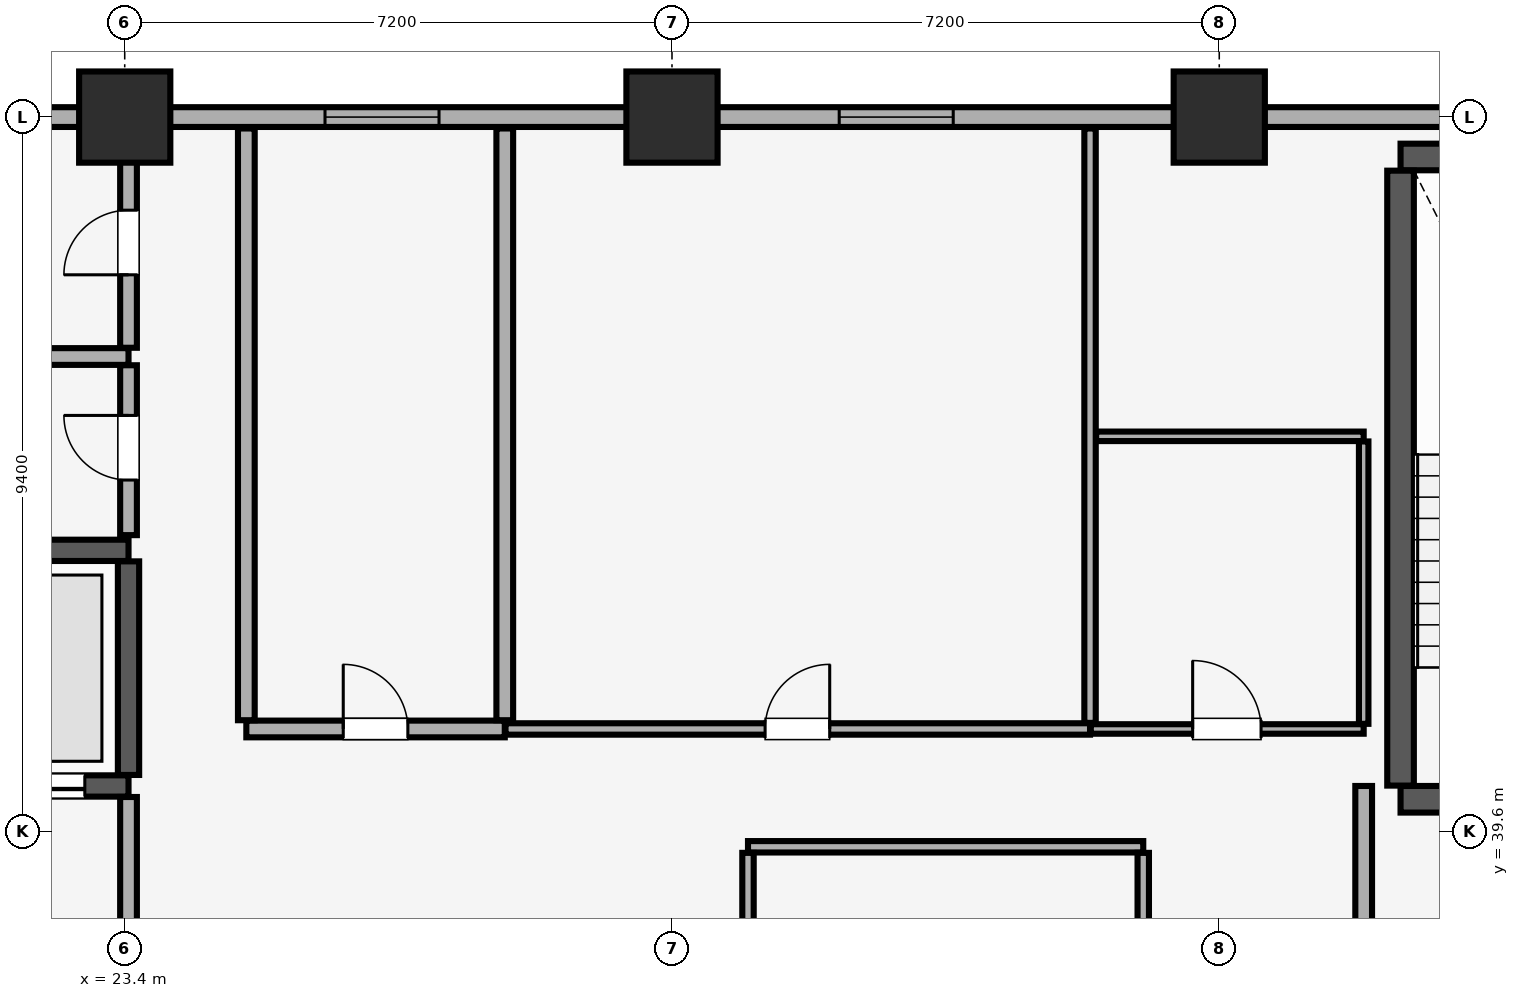
"""IFC4 building model, lengths in metres.
Left out: names, types, materials, properties, quantities, classifications, styles, units other than length and angle.
Written with IfcOpenShell. Run it as: python <this file> out.ifc"""

import sys

from ifc_helpers import new_model, si_unit, direction, frame, frame_2d, origin, origin_2d, place, context, subcontext, project, spatial, rectangle, extrude, element, fill, save


model = new_model("IFC4")
c1 = context("Model", 3, precision=1e-05, world=origin(), true_north=direction((0.0, 1.0)))
c2 = subcontext(c1, "Body", "Model", "MODEL_VIEW")
j1 = project(units=[si_unit("LENGTHUNIT", "METRE"), si_unit("PLANEANGLEUNIT", "RADIAN")], contexts=[c1])
p1 = place(None, origin())
s1 = spatial("IfcSite", under=j1, at=p1, CompositionType="ELEMENT")
p2 = place(p1, origin())
s2 = spatial("IfcBuilding", under=s1, at=p2, CompositionType="ELEMENT")
p3 = place(p2, frame((0.0, 0.0, 93.05)))
s3 = spatial("IfcBuildingStorey", under=s2, at=p3, CompositionType="ELEMENT", Elevation=93.05)
for number, where, z_axis, x_axis in (
    (1, (23.4, 49.0, 0.0), (0.0, 0.0, 1.0), (1.0, 0.0, 0.0)),
    (2, (30.6, 49.0, 0.0), (0.0, 0.0, 1.0), (1.0, 0.0, 0.0)),
    (3, (37.8, 49.0, 0.0), (0.0, 0.0, 1.0), (1.0, 0.0, 0.0)),
):
    element("IfcColumn", number, at=place(p3, frame(where, z_axis=z_axis, x_axis=x_axis)), inside=s3, PredefinedType="COLUMN", context=c2, shape_type="SweptSolid", body=[
        extrude(rectangle(XDim=1.2, YDim=1.2, at=origin_2d()), origin(), (0.0, 0.0, 1.0), 3.51),
    ])
p4 = place(p3, frame((79.8, 49.0, 0.0), z_axis=(0.0, 0.0, 1.0), x_axis=(-1.0, 0.0, 0.0)))
e4 = element("IfcWall", 4, at=p4, inside=s3, PredefinedType="SOLIDWALL", context=c2, shape_type="SweptSolid", body=[
    extrude(rectangle(XDim=75.6, YDim=0.26, at=frame_2d((37.8, 0.0))), origin(), (0.0, 0.0, 1.0), 2.56),
])
p5 = place(p4, frame((72.565, 0.0, 0.85)))
e5 = element("IfcOpeningElement", 5, at=p5, cuts=e4, PredefinedType="OPENING", context=c2, shape_type="SweptSolid", body=[
    extrude(rectangle(XDim=1.5, YDim=1.4, at=frame_2d((0.75, 0.7))), frame((0.0, 0.14, 0.0), z_axis=(0.0, -1.0, 0.0), x_axis=(1.0, 0.0, 0.0)), (0.0, 0.0, 1.0), 0.28),
])
p6 = place(p4, frame((67.45, 0.0, 0.85)))
e6 = element("IfcOpeningElement", 6, at=p6, cuts=e4, PredefinedType="OPENING", context=c2, shape_type="SweptSolid", body=[
    extrude(rectangle(XDim=1.5, YDim=1.4, at=frame_2d((0.75, 0.7))), frame((0.0, 0.14, 0.0), z_axis=(0.0, -1.0, 0.0), x_axis=(1.0, 0.0, 0.0)), (0.0, 0.0, 1.0), 0.28),
])
p7 = place(p4, frame((7.6, 0.0, 0.85)))
e7 = element("IfcOpeningElement", 7, at=p7, cuts=e4, PredefinedType="OPENING", context=c2, shape_type="SweptSolid", body=[
    extrude(rectangle(XDim=1.5, YDim=1.4, at=frame_2d((0.75, 0.7))), frame((0.0, 0.14, 0.0), z_axis=(0.0, -1.0, 0.0), x_axis=(1.0, 0.0, 0.0)), (0.0, 0.0, 1.0), 0.28),
])
p8 = place(p4, frame((1.535, 0.0, 0.85)))
e8 = element("IfcOpeningElement", 8, at=p8, cuts=e4, PredefinedType="OPENING", context=c2, shape_type="SweptSolid", body=[
    extrude(rectangle(XDim=1.5, YDim=1.4, at=frame_2d((0.75, 0.7))), frame((0.0, 0.14, 0.0), z_axis=(0.0, -1.0, 0.0), x_axis=(1.0, 0.0, 0.0)), (0.0, 0.0, 1.0), 0.28),
])
p9 = place(p4, frame((52.265, 0.0, 0.9)))
e9 = element("IfcOpeningElement", 9, at=p9, cuts=e4, PredefinedType="OPENING", context=c2, shape_type="SweptSolid", body=[
    extrude(rectangle(XDim=1.5, YDim=1.4, at=frame_2d((0.75, 0.7))), frame((0.0, 0.14, 0.0), z_axis=(0.0, -1.0, 0.0), x_axis=(1.0, 0.0, 0.0)), (0.0, 0.0, 1.0), 0.28),
])
p10 = place(p4, frame((45.5, 0.0, 0.9)))
e10 = element("IfcOpeningElement", 10, at=p10, cuts=e4, PredefinedType="OPENING", context=c2, shape_type="SweptSolid", body=[
    extrude(rectangle(XDim=1.5, YDim=1.4, at=frame_2d((0.75, 0.7))), frame((0.0, 0.14, 0.0), z_axis=(0.0, -1.0, 0.0), x_axis=(1.0, 0.0, 0.0)), (0.0, 0.0, 1.0), 0.28),
])
p11 = place(p4, frame((31.05, 0.0, 0.9)))
e11 = element("IfcOpeningElement", 11, at=p11, cuts=e4, PredefinedType="OPENING", context=c2, shape_type="SweptSolid", body=[
    extrude(rectangle(XDim=1.5, YDim=1.4, at=frame_2d((0.75, 0.7))), frame((0.0, 0.14, 0.0), z_axis=(0.0, -1.0, 0.0), x_axis=(1.0, 0.0, 0.0)), (0.0, 0.0, 1.0), 0.28),
])
p12 = place(p4, frame((27.85, 0.0, 0.9)))
e12 = element("IfcOpeningElement", 12, at=p12, cuts=e4, PredefinedType="OPENING", context=c2, shape_type="SweptSolid", body=[
    extrude(rectangle(XDim=1.5, YDim=1.4, at=frame_2d((0.75, 0.7))), frame((0.0, 0.14, 0.0), z_axis=(0.0, -1.0, 0.0), x_axis=(1.0, 0.0, 0.0)), (0.0, 0.0, 1.0), 0.28),
])
p13 = place(p4, frame((23.485, 0.0, 0.9)))
e13 = element("IfcOpeningElement", 13, at=p13, cuts=e4, PredefinedType="OPENING", context=c2, shape_type="SweptSolid", body=[
    extrude(rectangle(XDim=1.5, YDim=1.4, at=frame_2d((0.75, 0.7))), frame((0.0, 0.14, 0.0), z_axis=(0.0, -1.0, 0.0), x_axis=(1.0, 0.0, 0.0)), (0.0, 0.0, 1.0), 0.28),
])
p14 = place(p3, frame((40.185, 40.025, 0.0), z_axis=(0.0, 0.0, 1.0), x_axis=(1.0, 0.0, 0.0)))
e14 = element("IfcWall", 14, at=p14, inside=s3, PredefinedType="SHEAR", context=c2, shape_type="SweptSolid", body=[
    extrude(rectangle(XDim=3.63, YDim=0.35, at=frame_2d((1.815, 0.0))), origin(), (0.0, 0.0, 1.0), 3.51),
])
p15 = place(p14, frame((1.24, 0.0, 0.0)))
e15 = element("IfcOpeningElement", 15, at=p15, cuts=e14, PredefinedType="OPENING", context=c2, shape_type="SweptSolid", body=[
    extrude(rectangle(XDim=1.15, YDim=2.15, at=frame_2d((0.575, 1.075))), frame((0.0, 0.185, 0.0), z_axis=(0.0, -1.0, 0.0), x_axis=(1.0, 0.0, 0.0)), (0.0, 0.0, 1.0), 0.37),
])
p16 = place(p3, frame((40.185, 48.475, 0.0), z_axis=(0.0, 0.0, 1.0), x_axis=(1.0, 0.0, 0.0)))
e16 = element("IfcWall", 16, at=p16, inside=s3, PredefinedType="SHEAR", context=c2, shape_type="SweptSolid", body=[
    extrude(rectangle(XDim=3.63, YDim=0.35, at=frame_2d((1.815, 0.0))), origin(), (0.0, 0.0, 1.0), 3.51),
])
p17 = place(p3, frame((40.185, 40.205, 0.0), z_axis=(0.0, 0.0, 1.0), x_axis=(0.0, 1.0, 0.0)))
e17 = element("IfcWall", 17, at=p17, inside=s3, PredefinedType="SHEAR", context=c2, shape_type="SweptSolid", body=[
    extrude(rectangle(XDim=8.09, YDim=0.35, at=frame_2d((4.045, 0.0))), origin(), (0.0, 0.0, 1.0), 3.51),
])
p18 = place(p3, frame((21.035, 40.2, 0.0), z_axis=(0.0, 0.0, 1.0), x_axis=(1.0, 0.0, 0.0)))
e18 = element("IfcWall", 18, at=p18, inside=s3, PredefinedType="SHEAR", context=c2, shape_type="SweptSolid", body=[
    extrude(rectangle(XDim=2.415, YDim=0.28, at=frame_2d((1.208, 0.0))), origin(), (0.0, 0.0, 1.0), 3.51),
])
p19 = place(p18, frame((0.54, 0.0, 0.0)))
e19 = element("IfcOpeningElement", 19, at=p19, cuts=e18, PredefinedType="OPENING", context=c2, shape_type="SweptSolid", body=[
    extrude(rectangle(XDim=1.3, YDim=2.3, at=frame_2d((0.65, 1.15))), frame((0.0, 0.15, 0.0), z_axis=(0.0, -1.0, 0.0), x_axis=(1.0, 0.0, 0.0)), (0.0, 0.0, 1.0), 0.3),
])
p20 = place(p3, frame((21.035, 43.3, 0.0), z_axis=(0.0, 0.0, 1.0), x_axis=(1.0, 0.0, 0.0)))
e20 = element("IfcWall", 20, at=p20, inside=s3, PredefinedType="SHEAR", context=c2, shape_type="SweptSolid", body=[
    extrude(rectangle(XDim=2.415, YDim=0.28, at=frame_2d((1.208, 0.0))), origin(), (0.0, 0.0, 1.0), 3.51),
])
p21 = place(p3, frame((23.45, 40.345, 0.0), z_axis=(0.0, 0.0, 1.0), x_axis=(0.0, 1.0, 0.0)))
e21 = element("IfcWall", 21, at=p21, inside=s3, PredefinedType="SHEAR", context=c2, shape_type="SweptSolid", body=[
    extrude(rectangle(XDim=2.81, YDim=0.28, at=frame_2d((1.405, 0.0))), origin(), (0.0, 0.0, 1.0), 3.51),
])
p22 = place(p3, frame((23.45, 34.415, 0.0), z_axis=(0.0, 0.0, 1.0), x_axis=(0.0, 1.0, 0.0)))
e22 = element("IfcWall", 22, at=p22, inside=s3, PredefinedType="PARTITIONING", context=c2, shape_type="SweptSolid", body=[
    extrude(rectangle(XDim=5.64, YDim=0.22, at=frame_2d((2.82, 0.0))), origin(), (0.0, 0.0, 1.0), 3.51),
])
p23 = place(p3, frame((39.7, 34.415, 0.0), z_axis=(0.0, 0.0, 1.0), x_axis=(0.0, 1.0, 0.0)))
e23 = element("IfcWall", 23, at=p23, inside=s3, PredefinedType="PARTITIONING", context=c2, shape_type="SweptSolid", body=[
    extrude(rectangle(XDim=5.785, YDim=0.22, at=frame_2d((2.893, 0.0))), origin(), (0.0, 0.0, 1.0), 3.51),
])
p24 = place(p3, frame((21.035, 45.85, 0.0), z_axis=(0.0, 0.0, 1.0), x_axis=(1.0, 0.0, 0.0)))
e24 = element("IfcWall", 24, at=p24, inside=s3, PredefinedType="PARTITIONING", context=c2, shape_type="SweptSolid", body=[
    extrude(rectangle(XDim=2.415, YDim=0.22, at=frame_2d((1.208, 0.0))), origin(), (0.0, 0.0, 1.0), 3.51),
])
p25 = place(p3, frame((23.45, 43.5, 0.0), z_axis=(0.0, 0.0, 1.0), x_axis=(0.0, 1.0, 0.0)))
e25 = element("IfcWall", 25, at=p25, inside=s3, PredefinedType="PARTITIONING", context=c2, shape_type="SweptSolid", body=[
    extrude(rectangle(XDim=2.235, YDim=0.22, at=frame_2d((1.118, 0.0))), origin(), (0.0, 0.0, 1.0), 3.51),
])
p26 = place(p25, frame((0.725, 0.0, 0.0)))
e26 = element("IfcOpeningElement", 26, at=p26, cuts=e25, PredefinedType="OPENING", context=c2, shape_type="SweptSolid", body=[
    extrude(rectangle(XDim=0.85, YDim=2.1, at=frame_2d((0.425, 1.05))), frame((0.0, 0.12, 0.0), z_axis=(0.0, -1.0, 0.0), x_axis=(1.0, 0.0, 0.0)), (0.0, 0.0, 1.0), 0.24),
])
p27 = place(p3, frame((23.45, 45.965, 0.0), z_axis=(0.0, 0.0, 1.0), x_axis=(0.0, 1.0, 0.0)))
e27 = element("IfcWall", 27, at=p27, inside=s3, PredefinedType="PARTITIONING", context=c2, shape_type="SweptSolid", body=[
    extrude(rectangle(XDim=2.885, YDim=0.22, at=frame_2d((1.442, 0.0))), origin(), (0.0, 0.0, 1.0), 3.51),
])
p28 = place(p27, frame((0.96, 0.0, 0.0)))
e28 = element("IfcOpeningElement", 28, at=p28, cuts=e27, PredefinedType="OPENING", context=c2, shape_type="SweptSolid", body=[
    extrude(rectangle(XDim=0.85, YDim=2.1, at=frame_2d((0.425, 1.05))), frame((0.0, 0.12, 0.0), z_axis=(0.0, -1.0, 0.0), x_axis=(1.0, 0.0, 0.0)), (0.0, 0.0, 1.0), 0.24),
])
p29 = place(p3, frame((31.6, 39.4, 0.0), z_axis=(0.0, 0.0, 1.0), x_axis=(1.0, 0.0, 0.0)))
e29 = element("IfcWall", 29, at=p29, inside=s3, PredefinedType="PARTITIONING", context=c2, shape_type="SweptSolid", body=[
    extrude(rectangle(XDim=5.2, YDim=0.15, at=frame_2d((2.6, 0.0))), origin(), (0.0, 0.0, 1.0), 3.51),
])
for number, where, z_axis, x_axis in (
    (30, (31.6, 34.38, 0.0), (0.0, 0.0, 1.0), (0.0, 1.0, 0.0)),
    (31, (36.8, 34.38, 0.0), (0.0, 0.0, 1.0), (0.0, 1.0, 0.0)),
):
    element("IfcWall", number, at=place(p3, frame(where, z_axis=z_axis, x_axis=x_axis)), inside=s3, PredefinedType="PARTITIONING", context=c2, shape_type="SweptSolid", body=[
        extrude(rectangle(XDim=4.94, YDim=0.15, at=frame_2d((2.47, 0.0))), origin(), (0.0, 0.0, 1.0), 3.51),
    ])
p30 = place(p3, frame((25.0, 40.95, 0.0), z_axis=(0.0, 0.0, 1.0), x_axis=(1.0, 0.0, 0.0)))
e32 = element("IfcWall", 32, at=p30, inside=s3, PredefinedType="PARTITIONING", context=c2, shape_type="SweptSolid", body=[
    extrude(rectangle(XDim=3.4, YDim=0.22, at=frame_2d((1.7, 0.0))), origin(), (0.0, 0.0, 1.0), 3.51),
])
p31 = place(p30, frame((1.275, 0.0, 0.0)))
e33 = element("IfcOpeningElement", 33, at=p31, cuts=e32, PredefinedType="OPENING", context=c2, shape_type="SweptSolid", body=[
    extrude(rectangle(XDim=0.85, YDim=2.1, at=frame_2d((0.425, 1.05))), frame((0.0, 0.12, 0.0), z_axis=(0.0, -1.0, 0.0), x_axis=(1.0, 0.0, 0.0)), (0.0, 0.0, 1.0), 0.24),
])
for number, where, z_axis, x_axis in (
    (34, (25.0, 41.065, 0.0), (0.0, 0.0, 1.0), (0.0, 1.0, 0.0)),
    (35, (28.4, 41.065, 0.0), (0.0, 0.0, 1.0), (0.0, 1.0, 0.0)),
):
    element("IfcWall", number, at=place(p3, frame(where, z_axis=z_axis, x_axis=x_axis)), inside=s3, PredefinedType="PARTITIONING", context=c2, shape_type="SweptSolid", body=[
        extrude(rectangle(XDim=7.785, YDim=0.22, at=frame_2d((3.893, 0.0))), origin(), (0.0, 0.0, 1.0), 3.51),
    ])
p32 = place(p3, frame((28.41, 40.95, 0.0), z_axis=(0.0, 0.0, 1.0), x_axis=(1.0, 0.0, 0.0)))
e36 = element("IfcWall", 36, at=p32, inside=s3, PredefinedType="PARTITIONING", context=c2, shape_type="SweptSolid", body=[
    extrude(rectangle(XDim=7.69, YDim=0.15, at=frame_2d((3.845, 0.0))), origin(), (0.0, 0.0, 1.0), 3.51),
])
p33 = place(p32, frame((3.415, 0.0, 0.0)))
e37 = element("IfcOpeningElement", 37, at=p33, cuts=e36, PredefinedType="OPENING", context=c2, shape_type="SweptSolid", body=[
    extrude(rectangle(XDim=0.85, YDim=2.1, at=frame_2d((0.425, 1.05))), frame((0.0, 0.085, 0.0), z_axis=(0.0, -1.0, 0.0), x_axis=(1.0, 0.0, 0.0)), (0.0, 0.0, 1.0), 0.17),
])
p34 = place(p3, frame((36.1, 41.03, 0.0), z_axis=(0.0, 0.0, 1.0), x_axis=(0.0, 1.0, 0.0)))
e38 = element("IfcWall", 38, at=p34, inside=s3, PredefinedType="PARTITIONING", context=c2, shape_type="SweptSolid", body=[
    extrude(rectangle(XDim=7.82, YDim=0.15, at=frame_2d((3.91, 0.0))), origin(), (0.0, 0.0, 1.0), 3.51),
])
p35 = place(p3, frame((36.11, 40.95, 0.0), z_axis=(0.0, 0.0, 1.0), x_axis=(1.0, 0.0, 0.0)))
e39 = element("IfcWall", 39, at=p35, inside=s3, PredefinedType="PARTITIONING", context=c2, shape_type="SweptSolid", body=[
    extrude(rectangle(XDim=3.59, YDim=0.125, at=frame_2d((1.795, 0.0))), origin(), (0.0, 0.0, 1.0), 3.51),
])
p36 = place(p35, frame((1.34, 0.0, 0.0)))
e40 = element("IfcOpeningElement", 40, at=p36, cuts=e39, PredefinedType="OPENING", context=c2, shape_type="SweptSolid", body=[
    extrude(rectangle(XDim=0.9, YDim=2.1, at=frame_2d((0.45, 1.05))), frame((0.0, 0.073, 0.0), z_axis=(0.0, -1.0, 0.0), x_axis=(1.0, 0.0, 0.0)), (0.0, 0.0, 1.0), 0.145),
])
p37 = place(p3, frame((36.18, 44.8, 0.0), z_axis=(0.0, 0.0, 1.0), x_axis=(1.0, 0.0, 0.0)))
e41 = element("IfcWall", 41, at=p37, inside=s3, PredefinedType="PARTITIONING", context=c2, shape_type="SweptSolid", body=[
    extrude(rectangle(XDim=3.52, YDim=0.125, at=frame_2d((1.76, 0.0))), origin(), (0.0, 0.0, 1.0), 3.51),
])
p38 = place(p3, frame((39.7, 41.018, 0.0), z_axis=(0.0, 0.0, 1.0), x_axis=(0.0, 1.0, 0.0)))
e42 = element("IfcWall", 42, at=p38, inside=s3, PredefinedType="PARTITIONING", context=c2, shape_type="SweptSolid", body=[
    extrude(rectangle(XDim=3.715, YDim=0.125, at=frame_2d((1.857, 0.0))), origin(), (0.0, 0.0, 1.0), 3.51),
])
p39 = place(p9, origin())
e43 = element("IfcWindow", 43, at=p39, inside=s3, PartitioningType="SINGLE_PANEL", PredefinedType="WINDOW", context=c2, shape_type="SweptSolid", body=[
    extrude(rectangle(XDim=1.5, YDim=1.4, at=frame_2d((0.75, 0.7))), frame((0.0, 0.03, 0.0), z_axis=(0.0, -1.0, 0.0), x_axis=(1.0, 0.0, 0.0)), (0.0, 0.0, 1.0), 0.06),
])
fill(e9, e43)
p40 = place(p10, origin())
e44 = element("IfcWindow", 44, at=p40, inside=s3, PartitioningType="SINGLE_PANEL", PredefinedType="WINDOW", context=c2, shape_type="SweptSolid", body=[
    extrude(rectangle(XDim=1.5, YDim=1.4, at=frame_2d((0.75, 0.7))), frame((0.0, 0.03, 0.0), z_axis=(0.0, -1.0, 0.0), x_axis=(1.0, 0.0, 0.0)), (0.0, 0.0, 1.0), 0.06),
])
fill(e10, e44)
p41 = place(p19, origin())
e45 = element("IfcDoor", 45, at=p41, inside=s3, OperationType="DOUBLE_DOOR_SLIDING", PredefinedType="DOOR", context=c2, shape_type="SweptSolid", body=[
    extrude(rectangle(XDim=1.3, YDim=2.3, at=frame_2d((0.65, 1.15))), frame((0.0, 0.025, 0.0), z_axis=(0.0, -1.0, 0.0), x_axis=(1.0, 0.0, 0.0)), (0.0, 0.0, 1.0), 0.05),
])
fill(e19, e45)
p42 = place(p26, origin())
e46 = element("IfcDoor", 46, at=p42, inside=s3, OperationType="SINGLE_SWING_RIGHT", PredefinedType="DOOR", context=c2, shape_type="SweptSolid", body=[
    extrude(rectangle(XDim=0.85, YDim=2.1, at=frame_2d((0.425, 1.05))), frame((0.0, 0.025, 0.0), z_axis=(0.0, -1.0, 0.0), x_axis=(1.0, 0.0, 0.0)), (0.0, 0.0, 1.0), 0.05),
])
fill(e26, e46)
p43 = place(p28, origin())
e47 = element("IfcDoor", 47, at=p43, inside=s3, OperationType="SINGLE_SWING_LEFT", PredefinedType="DOOR", context=c2, shape_type="SweptSolid", body=[
    extrude(rectangle(XDim=0.85, YDim=2.1, at=frame_2d((0.425, 1.05))), frame((0.0, 0.025, 0.0), z_axis=(0.0, -1.0, 0.0), x_axis=(1.0, 0.0, 0.0)), (0.0, 0.0, 1.0), 0.05),
])
fill(e28, e47)
p44 = place(p31, origin())
e48 = element("IfcDoor", 48, at=p44, inside=s3, OperationType="SINGLE_SWING_LEFT", PredefinedType="DOOR", context=c2, shape_type="SweptSolid", body=[
    extrude(rectangle(XDim=0.85, YDim=2.1, at=frame_2d((0.425, 1.05))), frame((0.0, 0.025, 0.0), z_axis=(0.0, -1.0, 0.0), x_axis=(1.0, 0.0, 0.0)), (0.0, 0.0, 1.0), 0.05),
])
fill(e33, e48)
p45 = place(p33, origin())
e49 = element("IfcDoor", 49, at=p45, inside=s3, OperationType="SINGLE_SWING_RIGHT", PredefinedType="DOOR", context=c2, shape_type="SweptSolid", body=[
    extrude(rectangle(XDim=0.85, YDim=2.1, at=frame_2d((0.425, 1.05))), frame((0.0, 0.025, 0.0), z_axis=(0.0, -1.0, 0.0), x_axis=(1.0, 0.0, 0.0)), (0.0, 0.0, 1.0), 0.05),
])
fill(e37, e49)
p46 = place(p36, origin())
e50 = element("IfcDoor", 50, at=p46, inside=s3, OperationType="SINGLE_SWING_LEFT", PredefinedType="DOOR", context=c2, shape_type="SweptSolid", body=[
    extrude(rectangle(XDim=0.9, YDim=2.1, at=frame_2d((0.45, 1.05))), frame((0.0, 0.025, 0.0), z_axis=(0.0, -1.0, 0.0), x_axis=(1.0, 0.0, 0.0)), (0.0, 0.0, 1.0), 0.05),
])
fill(e40, e50)
save(model, sys.argv[1])
